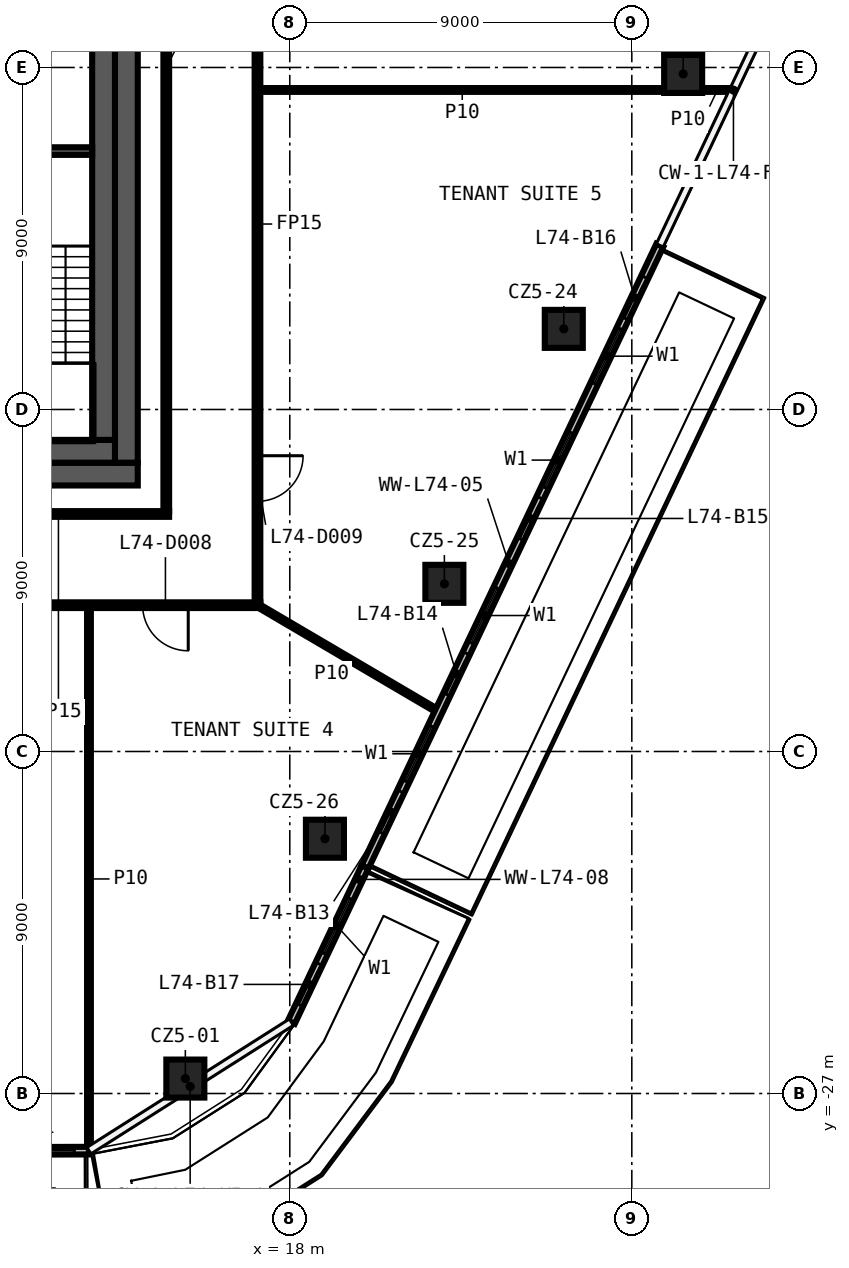
"""IFC4 building model, lengths in metres.
Left out: names, types, materials, properties, quantities, classifications, styles, units other than length and angle.
Written with IfcOpenShell. Run it as: python <this file> out.ifc"""

import sys

from ifc_helpers import new_model, si_unit, direction, frame, frame_2d, origin, origin_2d, place, context, subcontext, project, spatial, rectangle, extrude, element, fill, save


model = new_model("IFC4")
c1 = context("Model", 3, precision=1e-05, world=origin(), true_north=direction((0.0, 1.0)))
c2 = subcontext(c1, "Body", "Model", "MODEL_VIEW")
j1 = project(units=[si_unit("LENGTHUNIT", "METRE"), si_unit("PLANEANGLEUNIT", "RADIAN")], contexts=[c1])
p1 = place(None, origin())
s1 = spatial("IfcSite", under=j1, at=p1, CompositionType="ELEMENT")
p2 = place(p1, origin())
s2 = spatial("IfcBuilding", under=s1, at=p2, CompositionType="ELEMENT")
p3 = place(p2, frame((0.0, 0.0, 344.6)))
s3 = spatial("IfcBuildingStorey", under=s2, at=p3, CompositionType="ELEMENT", Elevation=344.6)
for number, where, z_axis, x_axis in (
    (1, (15.252, -26.607, 0.0), (0.0, 0.0, 1.0), (1.0, 0.0, 0.0)),
    (2, (28.351, -0.17, 0.0), (0.0, 0.0, 1.0), (1.0, 0.0, 0.0)),
    (3, (25.21, -6.879, 0.0), (0.0, 0.0, 1.0), (1.0, 0.0, 0.0)),
    (4, (22.068, -13.588, 0.0), (0.0, 0.0, 1.0), (1.0, 0.0, 0.0)),
    (5, (18.925, -20.296, 0.0), (0.0, 0.0, 1.0), (1.0, 0.0, 0.0)),
):
    element("IfcColumn", number, at=place(p3, frame(where, z_axis=z_axis, x_axis=x_axis)), inside=s3, PredefinedType="COLUMN", context=c2, shape_type="SweptSolid", body=[
        extrude(rectangle(XDim=1.0, YDim=1.0, at=origin_2d()), origin(), (0.0, 0.0, 1.0), 3.82),
    ])
p4 = place(p3, frame((17.225, -14.15, 0.0), z_axis=(0.0, 0.0, 1.0), x_axis=(-1.0, 0.0, 0.0)))
e6 = element("IfcWall", 6, at=p4, inside=s3, PredefinedType="PARTITIONING", context=c2, shape_type="SweptSolid", body=[
    extrude(rectangle(XDim=34.45, YDim=0.15, at=frame_2d((17.225, 0.0))), origin(), (0.0, 0.0, 1.0), 3.82),
])
p5 = place(p4, frame((31.464, 0.0, 0.0)))
e7 = element("IfcOpeningElement", 7, at=p5, cuts=e6, PredefinedType="OPENING", context=c2, shape_type="SweptSolid", body=[
    extrude(rectangle(XDim=1.2, YDim=2.1, at=frame_2d((0.6, 1.05))), frame((0.0, 0.085, 0.0), z_axis=(0.0, -1.0, 0.0), x_axis=(1.0, 0.0, 0.0)), (0.0, 0.0, 1.0), 0.17),
])
p6 = place(p4, frame((24.546, 0.0, 0.0)))
e8 = element("IfcOpeningElement", 8, at=p6, cuts=e6, PredefinedType="OPENING", context=c2, shape_type="SweptSolid", body=[
    extrude(rectangle(XDim=1.2, YDim=2.1, at=frame_2d((0.6, 1.05))), frame((0.0, 0.085, 0.0), z_axis=(0.0, -1.0, 0.0), x_axis=(1.0, 0.0, 0.0)), (0.0, 0.0, 1.0), 0.17),
])
p7 = place(p4, frame((19.962, 0.0, 0.0)))
e9 = element("IfcOpeningElement", 9, at=p7, cuts=e6, PredefinedType="OPENING", context=c2, shape_type="SweptSolid", body=[
    extrude(rectangle(XDim=1.2, YDim=2.1, at=frame_2d((0.6, 1.05))), frame((0.0, 0.085, 0.0), z_axis=(0.0, -1.0, 0.0), x_axis=(1.0, 0.0, 0.0)), (0.0, 0.0, 1.0), 0.17),
])
p8 = place(p4, frame((15.375, 0.0, 0.0)))
e10 = element("IfcOpeningElement", 10, at=p8, cuts=e6, PredefinedType="OPENING", context=c2, shape_type="SweptSolid", body=[
    extrude(rectangle(XDim=1.2, YDim=2.1, at=frame_2d((0.6, 1.05))), frame((0.0, 0.085, 0.0), z_axis=(0.0, -1.0, 0.0), x_axis=(1.0, 0.0, 0.0)), (0.0, 0.0, 1.0), 0.17),
])
p9 = place(p4, frame((10.788, 0.0, 0.0)))
e11 = element("IfcOpeningElement", 11, at=p9, cuts=e6, PredefinedType="OPENING", context=c2, shape_type="SweptSolid", body=[
    extrude(rectangle(XDim=1.2, YDim=2.1, at=frame_2d((0.6, 1.05))), frame((0.0, 0.085, 0.0), z_axis=(0.0, -1.0, 0.0), x_axis=(1.0, 0.0, 0.0)), (0.0, 0.0, 1.0), 0.17),
])
p10 = place(p4, frame((6.202, 0.0, 0.0)))
e12 = element("IfcOpeningElement", 12, at=p10, cuts=e6, PredefinedType="OPENING", context=c2, shape_type="SweptSolid", body=[
    extrude(rectangle(XDim=1.2, YDim=2.1, at=frame_2d((0.6, 1.05))), frame((0.0, 0.085, 0.0), z_axis=(0.0, -1.0, 0.0), x_axis=(1.0, 0.0, 0.0)), (0.0, 0.0, 1.0), 0.17),
])
p11 = place(p4, frame((1.897, 0.0, 0.0)))
e13 = element("IfcOpeningElement", 13, at=p11, cuts=e6, PredefinedType="OPENING", context=c2, shape_type="SweptSolid", body=[
    extrude(rectangle(XDim=1.2, YDim=2.1, at=frame_2d((0.6, 1.05))), frame((0.0, 0.085, 0.0), z_axis=(0.0, -1.0, 0.0), x_axis=(1.0, 0.0, 0.0)), (0.0, 0.0, 1.0), 0.17),
])
p12 = place(p3, frame((9.0, -11.75, 0.0), z_axis=(0.0, 0.0, 1.0), x_axis=(1.0, 0.0, 0.0)))
e14 = element("IfcWall", 14, at=p12, inside=s3, PredefinedType="PARTITIONING", context=c2, shape_type="SweptSolid", body=[
    extrude(rectangle(XDim=5.825, YDim=0.15, at=frame_2d((2.913, 0.0))), origin(), (0.0, 0.0, 1.0), 3.82),
])
p13 = place(p3, frame((17.225, -0.592, 0.0), z_axis=(0.0, 0.0, 1.0), x_axis=(1.0, 0.0, 0.0)))
e15 = element("IfcWall", 15, at=p13, inside=s3, PredefinedType="PARTITIONING", context=c2, shape_type="SweptSolid", body=[
    extrude(rectangle(XDim=10.626, YDim=0.1, at=frame_2d((5.313, 0.0))), origin(), (0.0, 0.0, 1.0), 3.82),
])
p14 = place(p3, frame((28.851, -0.592, 0.0), z_axis=(0.0, 0.0, 1.0), x_axis=(1.0, 0.0, 0.0)))
e16 = element("IfcWall", 16, at=p14, inside=s3, PredefinedType="PARTITIONING", context=c2, shape_type="SweptSolid", body=[
    extrude(rectangle(XDim=0.803, YDim=0.1, at=frame_2d((0.402, 0.0))), origin(), (0.0, 0.0, 1.0), 3.82),
])
p15 = place(p3, frame((17.15, 14.075, 0.0), z_axis=(0.0, 0.0, 1.0), x_axis=(0.0, -1.0, 0.0)))
e17 = element("IfcWall", 17, at=p15, inside=s3, PredefinedType="PARTITIONING", context=c2, shape_type="SweptSolid", body=[
    extrude(rectangle(XDim=28.15, YDim=0.15, at=frame_2d((14.075, 0.0))), origin(), (0.0, 0.0, 1.0), 3.82),
])
p16 = place(p15, frame((24.292, 0.0, 0.0)))
e18 = element("IfcOpeningElement", 18, at=p16, cuts=e17, PredefinedType="OPENING", context=c2, shape_type="SweptSolid", body=[
    extrude(rectangle(XDim=1.2, YDim=2.1, at=frame_2d((0.6, 1.05))), frame((0.0, 0.085, 0.0), z_axis=(0.0, -1.0, 0.0), x_axis=(1.0, 0.0, 0.0)), (0.0, 0.0, 1.0), 0.17),
])
p17 = place(p15, frame((10.898, 0.0, 0.0)))
e19 = element("IfcOpeningElement", 19, at=p17, cuts=e17, PredefinedType="OPENING", context=c2, shape_type="SweptSolid", body=[
    extrude(rectangle(XDim=1.2, YDim=2.1, at=frame_2d((0.6, 1.05))), frame((0.0, 0.085, 0.0), z_axis=(0.0, -1.0, 0.0), x_axis=(1.0, 0.0, 0.0)), (0.0, 0.0, 1.0), 0.17),
])
p18 = place(p15, frame((3.873, 0.0, 0.0)))
e20 = element("IfcOpeningElement", 20, at=p18, cuts=e17, PredefinedType="OPENING", context=c2, shape_type="SweptSolid", body=[
    extrude(rectangle(XDim=1.2, YDim=2.1, at=frame_2d((0.6, 1.05))), frame((0.0, 0.085, 0.0), z_axis=(0.0, -1.0, 0.0), x_axis=(1.0, 0.0, 0.0)), (0.0, 0.0, 1.0), 0.17),
])
p19 = place(p3, frame((14.75, -11.675, 0.0), z_axis=(0.0, 0.0, 1.0), x_axis=(0.0, 1.0, 0.0)))
e21 = element("IfcWall", 21, at=p19, inside=s3, PredefinedType="PARTITIONING", context=c2, shape_type="SweptSolid", body=[
    extrude(rectangle(XDim=23.35, YDim=0.15, at=frame_2d((11.675, 0.0))), origin(), (0.0, 0.0, 1.0), 3.82),
])
p20 = place(p3, frame((12.716, -28.483, 0.0), z_axis=(0.0, 0.0, 1.0), x_axis=(0.0, 1.0, 0.0)))
e22 = element("IfcWall", 22, at=p20, inside=s3, PredefinedType="PARTITIONING", context=c2, shape_type="SweptSolid", body=[
    extrude(rectangle(XDim=14.258, YDim=0.1, at=frame_2d((7.129, 0.0))), origin(), (0.0, 0.0, 1.0), 3.82),
])
p21 = place(p3, frame((17.15, -14.15, 0.0), z_axis=(0.0, 0.0, 1.0), x_axis=(0.862152840624, -0.506648279781, 0.0)))
e23 = element("IfcWall", 23, at=p21, inside=s3, PredefinedType="PARTITIONING", context=c2, shape_type="SweptSolid", body=[
    extrude(rectangle(XDim=5.51, YDim=0.1, at=frame_2d((2.755, 0.0))), origin(), (0.0, 0.0, 1.0), 3.82),
])
p22 = place(p3, frame((-1.042, -28.546, 0.0), z_axis=(0.0, 0.0, 1.0), x_axis=(0.999995287953, 0.003069865224, 0.0)))
e24 = element("IfcWall", 24, at=p22, inside=s3, PredefinedType="SOLIDWALL", context=c2, shape_type="SweptSolid", body=[
    extrude(rectangle(XDim=13.758, YDim=0.2, at=frame_2d((6.879, 0.0))), origin(), (0.0, 0.0, 1.0), 3.7),
])
p23 = place(p22, frame((2.0, 0.0, 0.6)))
e25 = element("IfcOpeningElement", 25, at=p23, cuts=e24, PredefinedType="OPENING", context=c2, shape_type="SweptSolid", body=[
    extrude(rectangle(XDim=1.6, YDim=2.4, at=frame_2d((0.8, 1.2))), frame((0.0, 0.11, 0.0), z_axis=(0.0, -1.0, 0.0), x_axis=(1.0, 0.0, 0.0)), (0.0, 0.0, 1.0), 0.22),
])
p24 = place(p22, frame((0.5, 0.0, 0.0)))
e26 = element("IfcOpeningElement", 26, at=p24, cuts=e24, PredefinedType="OPENING", context=c2, shape_type="SweptSolid", body=[
    extrude(rectangle(XDim=1.2, YDim=2.4, at=frame_2d((0.6, 1.2))), frame((0.0, 0.11, 0.0), z_axis=(0.0, -1.0, 0.0), x_axis=(1.0, 0.0, 0.0)), (0.0, 0.0, 1.0), 0.22),
])
p25 = place(p22, frame((6.586, 0.0, 0.6)))
e27 = element("IfcOpeningElement", 27, at=p25, cuts=e24, PredefinedType="OPENING", context=c2, shape_type="SweptSolid", body=[
    extrude(rectangle(XDim=1.6, YDim=2.4, at=frame_2d((0.8, 1.2))), frame((0.0, 0.11, 0.0), z_axis=(0.0, -1.0, 0.0), x_axis=(1.0, 0.0, 0.0)), (0.0, 0.0, 1.0), 0.22),
])
p26 = place(p22, frame((5.086, 0.0, 0.0)))
e28 = element("IfcOpeningElement", 28, at=p26, cuts=e24, PredefinedType="OPENING", context=c2, shape_type="SweptSolid", body=[
    extrude(rectangle(XDim=1.2, YDim=2.4, at=frame_2d((0.6, 1.2))), frame((0.0, 0.11, 0.0), z_axis=(0.0, -1.0, 0.0), x_axis=(1.0, 0.0, 0.0)), (0.0, 0.0, 1.0), 0.22),
])
p27 = place(p22, frame((11.772, 0.0, 0.6)))
e29 = element("IfcOpeningElement", 29, at=p27, cuts=e24, PredefinedType="OPENING", context=c2, shape_type="SweptSolid", body=[
    extrude(rectangle(XDim=1.6, YDim=2.4, at=frame_2d((0.8, 1.2))), frame((0.0, 0.11, 0.0), z_axis=(0.0, -1.0, 0.0), x_axis=(1.0, 0.0, 0.0)), (0.0, 0.0, 1.0), 0.22),
])
p28 = place(p22, frame((10.272, 0.0, 0.0)))
e30 = element("IfcOpeningElement", 30, at=p28, cuts=e24, PredefinedType="OPENING", context=c2, shape_type="SweptSolid", body=[
    extrude(rectangle(XDim=1.2, YDim=2.4, at=frame_2d((0.6, 1.2))), frame((0.0, 0.11, 0.0), z_axis=(0.0, -1.0, 0.0), x_axis=(1.0, 0.0, 0.0)), (0.0, 0.0, 1.0), 0.22),
])
p29 = place(p3, frame((19.978, -21.042, 0.0), z_axis=(0.0, 0.0, 1.0), x_axis=(0.428526209531, 0.903529350793, 0.0)))
e31 = element("IfcWall", 31, at=p29, inside=s3, PredefinedType="SOLIDWALL", context=c2, shape_type="SweptSolid", body=[
    extrude(rectangle(XDim=18.107, YDim=0.2, at=frame_2d((9.053, 0.0))), origin(), (0.0, 0.0, 1.0), 3.7),
])
p30 = place(p29, frame((2.5, 0.0, 0.6)))
e32 = element("IfcOpeningElement", 32, at=p30, cuts=e31, PredefinedType="OPENING", context=c2, shape_type="SweptSolid", body=[
    extrude(rectangle(XDim=1.6, YDim=2.4, at=frame_2d((0.8, 1.2))), frame((0.0, 0.11, 0.0), z_axis=(0.0, -1.0, 0.0), x_axis=(1.0, 0.0, 0.0)), (0.0, 0.0, 1.0), 0.22),
])
p31 = place(p29, frame((1.0, 0.0, 0.0)))
e33 = element("IfcOpeningElement", 33, at=p31, cuts=e31, PredefinedType="OPENING", context=c2, shape_type="SweptSolid", body=[
    extrude(rectangle(XDim=1.2, YDim=2.4, at=frame_2d((0.6, 1.2))), frame((0.0, 0.11, 0.0), z_axis=(0.0, -1.0, 0.0), x_axis=(1.0, 0.0, 0.0)), (0.0, 0.0, 1.0), 0.22),
])
p32 = place(p29, frame((6.527, 0.0, 0.6)))
e34 = element("IfcOpeningElement", 34, at=p32, cuts=e31, PredefinedType="OPENING", context=c2, shape_type="SweptSolid", body=[
    extrude(rectangle(XDim=1.6, YDim=2.4, at=frame_2d((0.8, 1.2))), frame((0.0, 0.11, 0.0), z_axis=(0.0, -1.0, 0.0), x_axis=(1.0, 0.0, 0.0)), (0.0, 0.0, 1.0), 0.22),
])
p33 = place(p29, frame((5.027, 0.0, 0.0)))
e35 = element("IfcOpeningElement", 35, at=p33, cuts=e31, PredefinedType="OPENING", context=c2, shape_type="SweptSolid", body=[
    extrude(rectangle(XDim=1.2, YDim=2.4, at=frame_2d((0.6, 1.2))), frame((0.0, 0.11, 0.0), z_axis=(0.0, -1.0, 0.0), x_axis=(1.0, 0.0, 0.0)), (0.0, 0.0, 1.0), 0.22),
])
p34 = place(p29, frame((11.053, 0.0, 0.6)))
e36 = element("IfcOpeningElement", 36, at=p34, cuts=e31, PredefinedType="OPENING", context=c2, shape_type="SweptSolid", body=[
    extrude(rectangle(XDim=1.6, YDim=2.4, at=frame_2d((0.8, 1.2))), frame((0.0, 0.11, 0.0), z_axis=(0.0, -1.0, 0.0), x_axis=(1.0, 0.0, 0.0)), (0.0, 0.0, 1.0), 0.22),
])
p35 = place(p29, frame((9.553, 0.0, 0.0)))
e37 = element("IfcOpeningElement", 37, at=p35, cuts=e31, PredefinedType="OPENING", context=c2, shape_type="SweptSolid", body=[
    extrude(rectangle(XDim=1.2, YDim=2.4, at=frame_2d((0.6, 1.2))), frame((0.0, 0.11, 0.0), z_axis=(0.0, -1.0, 0.0), x_axis=(1.0, 0.0, 0.0)), (0.0, 0.0, 1.0), 0.22),
])
p36 = place(p29, frame((14.08, 0.0, 0.6)))
e38 = element("IfcOpeningElement", 38, at=p36, cuts=e31, PredefinedType="OPENING", context=c2, shape_type="SweptSolid", body=[
    extrude(rectangle(XDim=1.6, YDim=2.4, at=frame_2d((0.8, 1.2))), frame((0.0, 0.11, 0.0), z_axis=(0.0, -1.0, 0.0), x_axis=(1.0, 0.0, 0.0)), (0.0, 0.0, 1.0), 0.22),
])
p37 = place(p29, frame((15.98, 0.0, 0.0)))
e39 = element("IfcOpeningElement", 39, at=p37, cuts=e31, PredefinedType="OPENING", context=c2, shape_type="SweptSolid", body=[
    extrude(rectangle(XDim=1.2, YDim=2.4, at=frame_2d((0.6, 1.2))), frame((0.0, 0.11, 0.0), z_axis=(0.0, -1.0, 0.0), x_axis=(1.0, 0.0, 0.0)), (0.0, 0.0, 1.0), 0.22),
])
p38 = place(p3, frame((18.042, -25.123, 0.0), z_axis=(0.0, 0.0, 1.0), x_axis=(0.428481259611, 0.903550668287, 0.0)))
e40 = element("IfcWall", 40, at=p38, inside=s3, PredefinedType="SOLIDWALL", context=c2, shape_type="SweptSolid", body=[
    extrude(rectangle(XDim=4.517, YDim=0.2, at=frame_2d((2.259, 0.0))), origin(), (0.0, 0.0, 1.0), 3.7),
])
p39 = place(p38, frame((2.0, 0.0, 0.6)))
e41 = element("IfcOpeningElement", 41, at=p39, cuts=e40, PredefinedType="OPENING", context=c2, shape_type="SweptSolid", body=[
    extrude(rectangle(XDim=1.6, YDim=2.4, at=frame_2d((0.8, 1.2))), frame((0.0, 0.11, 0.0), z_axis=(0.0, -1.0, 0.0), x_axis=(1.0, 0.0, 0.0)), (0.0, 0.0, 1.0), 0.22),
])
p40 = place(p38, frame((0.5, 0.0, 0.0)))
e42 = element("IfcOpeningElement", 42, at=p40, cuts=e40, PredefinedType="OPENING", context=c2, shape_type="SweptSolid", body=[
    extrude(rectangle(XDim=1.2, YDim=2.4, at=frame_2d((0.6, 1.2))), frame((0.0, 0.11, 0.0), z_axis=(0.0, -1.0, 0.0), x_axis=(1.0, 0.0, 0.0)), (0.0, 0.0, 1.0), 0.22),
])
p41 = place(p3, frame((14.0, -10.7, 0.0), z_axis=(0.0, 0.0, 1.0), x_axis=(-1.0, 0.0, 0.0)))
e43 = element("IfcWall", 43, at=p41, inside=s3, PredefinedType="SHEAR", context=c2, shape_type="SweptSolid", body=[
    extrude(rectangle(XDim=28.0, YDim=0.6, at=frame_2d((14.0, 0.0))), origin(), (0.0, 0.0, 1.0), 3.82),
])
p42 = place(p41, frame((5.1, 0.0, 0.0)))
e44 = element("IfcOpeningElement", 44, at=p42, cuts=e43, PredefinedType="OPENING", context=c2, shape_type="SweptSolid", body=[
    extrude(rectangle(XDim=1.6, YDim=2.1, at=frame_2d((0.8, 1.05))), frame((0.0, 0.31, 0.0), z_axis=(0.0, -1.0, 0.0), x_axis=(1.0, 0.0, 0.0)), (0.0, 0.0, 1.0), 0.62),
])
p43 = place(p3, frame((13.7, 10.4, 0.0), z_axis=(0.0, 0.0, 1.0), x_axis=(0.0, -1.0, 0.0)))
e45 = element("IfcWall", 45, at=p43, inside=s3, PredefinedType="SHEAR", context=c2, shape_type="SweptSolid", body=[
    extrude(rectangle(XDim=20.8, YDim=0.6, at=frame_2d((10.4, 0.0))), origin(), (0.0, 0.0, 1.0), 3.82),
])
p44 = place(p3, frame((13.4, -10.1, 0.0), z_axis=(0.0, 0.0, 1.0), x_axis=(-1.0, 0.0, 0.0)))
e46 = element("IfcWall", 46, at=p44, inside=s3, PredefinedType="SHEAR", context=c2, shape_type="SweptSolid", body=[
    extrude(rectangle(XDim=4.1, YDim=0.6, at=frame_2d((2.05, 0.0))), origin(), (0.0, 0.0, 1.0), 3.82),
])
p45 = place(p3, frame((13.1, 9.8, 0.0), z_axis=(0.0, 0.0, 1.0), x_axis=(0.0, -1.0, 0.0)))
e47 = element("IfcWall", 47, at=p45, inside=s3, PredefinedType="SHEAR", context=c2, shape_type="SweptSolid", body=[
    extrude(rectangle(XDim=19.6, YDim=0.6, at=frame_2d((9.8, 0.0))), origin(), (0.0, 0.0, 1.0), 3.82),
])
p46 = place(p3, frame((9.45, -2.2, 0.0), z_axis=(0.0, 0.0, 1.0), x_axis=(1.0, 0.0, 0.0)))
e48 = element("IfcWall", 48, at=p46, inside=s3, PredefinedType="SHEAR", context=c2, shape_type="SweptSolid", body=[
    extrude(rectangle(XDim=3.35, YDim=0.2, at=frame_2d((1.675, 0.0))), origin(), (0.0, 0.0, 1.0), 3.82),
])
p47 = place(p11, origin())
e49 = element("IfcDoor", 49, at=p47, inside=s3, OperationType="SINGLE_SWING_LEFT", PredefinedType="DOOR", context=c2, shape_type="SweptSolid", body=[
    extrude(rectangle(XDim=1.2, YDim=2.1, at=frame_2d((0.6, 1.05))), frame((0.0, 0.025, 0.0), z_axis=(0.0, -1.0, 0.0), x_axis=(1.0, 0.0, 0.0)), (0.0, 0.0, 1.0), 0.05),
])
fill(e13, e49)
p48 = place(p16, origin())
e50 = element("IfcDoor", 50, at=p48, inside=s3, OperationType="SINGLE_SWING_RIGHT", PredefinedType="DOOR", context=c2, shape_type="SweptSolid", body=[
    extrude(rectangle(XDim=1.2, YDim=2.1, at=frame_2d((0.6, 1.05))), frame((0.0, 0.025, 0.0), z_axis=(0.0, -1.0, 0.0), x_axis=(1.0, 0.0, 0.0)), (0.0, 0.0, 1.0), 0.05),
])
fill(e18, e50)
p49 = place(p27, origin())
e51 = element("IfcWindow", 51, at=p49, inside=s3, PartitioningType="SINGLE_PANEL", PredefinedType="WINDOW", context=c2, shape_type="SweptSolid", body=[
    extrude(rectangle(XDim=1.6, YDim=2.4, at=frame_2d((0.8, 1.2))), frame((0.0, 0.03, 0.0), z_axis=(0.0, -1.0, 0.0), x_axis=(1.0, 0.0, 0.0)), (0.0, 0.0, 1.0), 0.06),
])
fill(e29, e51)
p50 = place(p30, origin())
e52 = element("IfcWindow", 52, at=p50, inside=s3, PartitioningType="SINGLE_PANEL", PredefinedType="WINDOW", context=c2, shape_type="SweptSolid", body=[
    extrude(rectangle(XDim=1.6, YDim=2.4, at=frame_2d((0.8, 1.2))), frame((0.0, 0.03, 0.0), z_axis=(0.0, -1.0, 0.0), x_axis=(1.0, 0.0, 0.0)), (0.0, 0.0, 1.0), 0.06),
])
fill(e32, e52)
p51 = place(p31, origin())
e53 = element("IfcDoor", 53, at=p51, inside=s3, OperationType="SLIDING_TO_LEFT", PredefinedType="DOOR", context=c2, shape_type="SweptSolid", body=[
    extrude(rectangle(XDim=1.2, YDim=2.4, at=frame_2d((0.6, 1.2))), frame((0.0, 0.025, 0.0), z_axis=(0.0, -1.0, 0.0), x_axis=(1.0, 0.0, 0.0)), (0.0, 0.0, 1.0), 0.05),
])
fill(e33, e53)
p52 = place(p32, origin())
e54 = element("IfcWindow", 54, at=p52, inside=s3, PartitioningType="SINGLE_PANEL", PredefinedType="WINDOW", context=c2, shape_type="SweptSolid", body=[
    extrude(rectangle(XDim=1.6, YDim=2.4, at=frame_2d((0.8, 1.2))), frame((0.0, 0.03, 0.0), z_axis=(0.0, -1.0, 0.0), x_axis=(1.0, 0.0, 0.0)), (0.0, 0.0, 1.0), 0.06),
])
fill(e34, e54)
p53 = place(p33, origin())
e55 = element("IfcDoor", 55, at=p53, inside=s3, OperationType="SLIDING_TO_LEFT", PredefinedType="DOOR", context=c2, shape_type="SweptSolid", body=[
    extrude(rectangle(XDim=1.2, YDim=2.4, at=frame_2d((0.6, 1.2))), frame((0.0, 0.025, 0.0), z_axis=(0.0, -1.0, 0.0), x_axis=(1.0, 0.0, 0.0)), (0.0, 0.0, 1.0), 0.05),
])
fill(e35, e55)
p54 = place(p34, origin())
e56 = element("IfcWindow", 56, at=p54, inside=s3, PartitioningType="SINGLE_PANEL", PredefinedType="WINDOW", context=c2, shape_type="SweptSolid", body=[
    extrude(rectangle(XDim=1.6, YDim=2.4, at=frame_2d((0.8, 1.2))), frame((0.0, 0.03, 0.0), z_axis=(0.0, -1.0, 0.0), x_axis=(1.0, 0.0, 0.0)), (0.0, 0.0, 1.0), 0.06),
])
fill(e36, e56)
p55 = place(p35, origin())
e57 = element("IfcDoor", 57, at=p55, inside=s3, OperationType="SLIDING_TO_LEFT", PredefinedType="DOOR", context=c2, shape_type="SweptSolid", body=[
    extrude(rectangle(XDim=1.2, YDim=2.4, at=frame_2d((0.6, 1.2))), frame((0.0, 0.025, 0.0), z_axis=(0.0, -1.0, 0.0), x_axis=(1.0, 0.0, 0.0)), (0.0, 0.0, 1.0), 0.05),
])
fill(e37, e57)
p56 = place(p36, origin())
e58 = element("IfcWindow", 58, at=p56, inside=s3, PartitioningType="SINGLE_PANEL", PredefinedType="WINDOW", context=c2, shape_type="SweptSolid", body=[
    extrude(rectangle(XDim=1.6, YDim=2.4, at=frame_2d((0.8, 1.2))), frame((0.0, 0.03, 0.0), z_axis=(0.0, -1.0, 0.0), x_axis=(1.0, 0.0, 0.0)), (0.0, 0.0, 1.0), 0.06),
])
fill(e38, e58)
p57 = place(p37, origin())
e59 = element("IfcDoor", 59, at=p57, inside=s3, OperationType="SLIDING_TO_LEFT", PredefinedType="DOOR", context=c2, shape_type="SweptSolid", body=[
    extrude(rectangle(XDim=1.2, YDim=2.4, at=frame_2d((0.6, 1.2))), frame((0.0, 0.025, 0.0), z_axis=(0.0, -1.0, 0.0), x_axis=(1.0, 0.0, 0.0)), (0.0, 0.0, 1.0), 0.05),
])
fill(e39, e59)
p58 = place(p39, origin())
e60 = element("IfcWindow", 60, at=p58, inside=s3, PartitioningType="SINGLE_PANEL", PredefinedType="WINDOW", context=c2, shape_type="SweptSolid", body=[
    extrude(rectangle(XDim=1.6, YDim=2.4, at=frame_2d((0.8, 1.2))), frame((0.0, 0.03, 0.0), z_axis=(0.0, -1.0, 0.0), x_axis=(1.0, 0.0, 0.0)), (0.0, 0.0, 1.0), 0.06),
])
fill(e41, e60)
p59 = place(p40, origin())
e61 = element("IfcDoor", 61, at=p59, inside=s3, OperationType="SLIDING_TO_LEFT", PredefinedType="DOOR", context=c2, shape_type="SweptSolid", body=[
    extrude(rectangle(XDim=1.2, YDim=2.4, at=frame_2d((0.6, 1.2))), frame((0.0, 0.025, 0.0), z_axis=(0.0, -1.0, 0.0), x_axis=(1.0, 0.0, 0.0)), (0.0, 0.0, 1.0), 0.05),
])
fill(e42, e61)
save(model, sys.argv[1])
